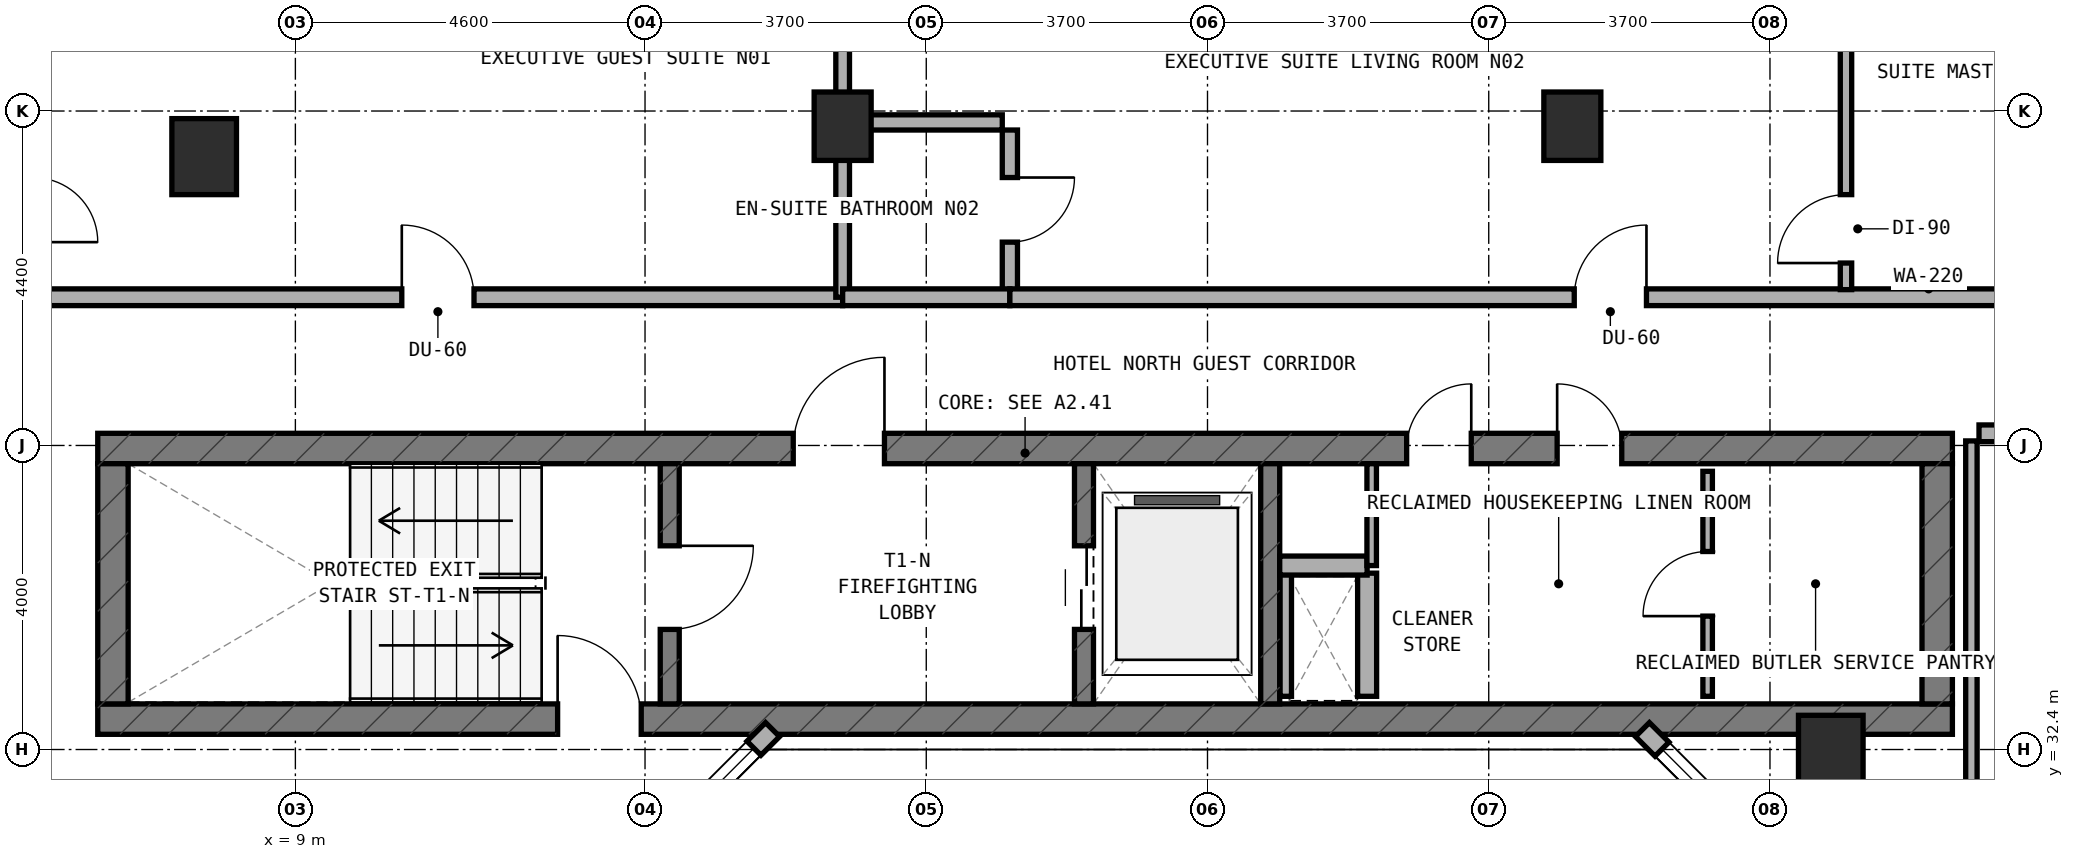
"""IFC4 building model, lengths in metres.
Left out: names, types, materials, properties, quantities, classifications, styles, units other than length and angle.
Written with IfcOpenShell. Run it as: python <this file> out.ifc"""

import sys

from ifc_helpers import new_model, si_unit, direction, frame, frame_2d, origin, origin_2d, place, context, subcontext, project, spatial, rectangle, extrude, element, fill, save


model = new_model("IFC4")
c1 = context("Model", 3, precision=1e-05, world=origin(), true_north=direction((0.0, 1.0)))
c2 = subcontext(c1, "Body", "Model", "MODEL_VIEW")
j1 = project(units=[si_unit("LENGTHUNIT", "METRE"), si_unit("PLANEANGLEUNIT", "RADIAN")], contexts=[c1])
p1 = place(None, origin())
s1 = spatial("IfcSite", under=j1, at=p1, CompositionType="ELEMENT")
p2 = place(p1, origin())
s2 = spatial("IfcBuilding", under=s1, at=p2, CompositionType="ELEMENT")
p3 = place(p2, frame((0.0, 0.0, 181.1)))
s3 = spatial("IfcBuildingStorey", under=s2, at=p3, CompositionType="ELEMENT", Elevation=181.1)
p4 = place(p3, frame((6.4, 32.8, 0.0), z_axis=(0.0, 0.0, 1.0), x_axis=(1.0, 0.0, 0.0)))
e1 = element("IfcWall", 1, at=p4, inside=s3, PredefinedType="SHEAR", context=c2, shape_type="SweptSolid", body=[
    extrude(rectangle(XDim=24.4, YDim=0.4, at=frame_2d((12.2, 0.0))), origin(), (0.0, 0.0, 1.0), 3.6),
])
p5 = place(p4, frame((6.05, 0.0, 0.0)))
e2 = element("IfcOpeningElement", 2, at=p5, cuts=e1, PredefinedType="OPENING", context=c2, shape_type="SweptSolid", body=[
    extrude(rectangle(XDim=1.1, YDim=2.15, at=frame_2d((0.55, 1.075))), frame((0.0, 0.21, 0.0), z_axis=(0.0, -1.0, 0.0), x_axis=(1.0, 0.0, 0.0)), (0.0, 0.0, 1.0), 0.42),
])
p6 = place(p3, frame((6.4, 36.36, 0.0), z_axis=(0.0, 0.0, 1.0), x_axis=(1.0, 0.0, 0.0)))
e3 = element("IfcWall", 3, at=p6, inside=s3, PredefinedType="SHEAR", context=c2, shape_type="SweptSolid", body=[
    extrude(rectangle(XDim=24.4, YDim=0.4, at=frame_2d((12.2, 0.0))), origin(), (0.0, 0.0, 1.0), 3.6),
])
p7 = place(p6, frame((9.15, 0.0, 0.0)))
e4 = element("IfcOpeningElement", 4, at=p7, cuts=e3, PredefinedType="OPENING", context=c2, shape_type="SweptSolid", body=[
    extrude(rectangle(XDim=1.2, YDim=2.15, at=frame_2d((0.6, 1.075))), frame((0.0, 0.21, 0.0), z_axis=(0.0, -1.0, 0.0), x_axis=(1.0, 0.0, 0.0)), (0.0, 0.0, 1.0), 0.42),
])
p8 = place(p6, frame((19.2, 0.0, 0.0)))
e5 = element("IfcOpeningElement", 5, at=p8, cuts=e3, PredefinedType="OPENING", context=c2, shape_type="SweptSolid", body=[
    extrude(rectangle(XDim=0.85, YDim=2.1, at=frame_2d((0.425, 1.05))), frame((0.0, 0.21, 0.0), z_axis=(0.0, -1.0, 0.0), x_axis=(1.0, 0.0, 0.0)), (0.0, 0.0, 1.0), 0.42),
])
p9 = place(p6, frame((17.22, 0.0, 0.0)))
e6 = element("IfcOpeningElement", 6, at=p9, cuts=e3, PredefinedType="OPENING", context=c2, shape_type="SweptSolid", body=[
    extrude(rectangle(XDim=0.85, YDim=2.1, at=frame_2d((0.425, 1.05))), frame((0.0, 0.21, 0.0), z_axis=(0.0, -1.0, 0.0), x_axis=(1.0, 0.0, 0.0)), (0.0, 0.0, 1.0), 0.42),
])
for number, where, z_axis, x_axis in (
    (7, (6.6, 33.0, 0.0), (0.0, 0.0, 1.0), (0.0, 1.0, 0.0)),
    (8, (30.6, 33.0, 0.0), (0.0, 0.0, 1.0), (0.0, 1.0, 0.0)),
):
    element("IfcWall", number, at=place(p3, frame(where, z_axis=z_axis, x_axis=x_axis)), inside=s3, PredefinedType="SHEAR", context=c2, shape_type="SweptSolid", body=[
        extrude(rectangle(XDim=3.16, YDim=0.4, at=frame_2d((1.58, 0.0))), origin(), (0.0, 0.0, 1.0), 3.6),
    ])
p10 = place(p3, frame((13.925, 33.0, 0.0), z_axis=(0.0, 0.0, 1.0), x_axis=(0.0, 1.0, 0.0)))
e9 = element("IfcWall", 9, at=p10, inside=s3, PredefinedType="STANDARD", context=c2, shape_type="SweptSolid", body=[
    extrude(rectangle(XDim=3.16, YDim=0.25, at=frame_2d((1.58, 0.0))), origin(), (0.0, 0.0, 1.0), 3.32),
])
p11 = place(p10, frame((0.98, 0.0, 0.0)))
e10 = element("IfcOpeningElement", 10, at=p11, cuts=e9, PredefinedType="OPENING", context=c2, shape_type="SweptSolid", body=[
    extrude(rectangle(XDim=1.1, YDim=2.15, at=frame_2d((0.55, 1.075))), frame((0.0, 0.135, 0.0), z_axis=(0.0, -1.0, 0.0), x_axis=(1.0, 0.0, 0.0)), (0.0, 0.0, 1.0), 0.27),
])
p12 = place(p3, frame((19.375, 33.0, 0.0), z_axis=(0.0, 0.0, 1.0), x_axis=(0.0, 1.0, 0.0)))
e11 = element("IfcWall", 11, at=p12, inside=s3, PredefinedType="STANDARD", context=c2, shape_type="SweptSolid", body=[
    extrude(rectangle(XDim=3.16, YDim=0.25, at=frame_2d((1.58, 0.0))), origin(), (0.0, 0.0, 1.0), 3.32),
])
p13 = place(p12, frame((0.98, 0.0, 0.0)))
e12 = element("IfcOpeningElement", 12, at=p13, cuts=e11, PredefinedType="OPENING", context=c2, shape_type="SweptSolid", body=[
    extrude(rectangle(XDim=1.1, YDim=2.15, at=frame_2d((0.55, 1.075))), frame((0.0, 0.135, 0.0), z_axis=(0.0, -1.0, 0.0), x_axis=(1.0, 0.0, 0.0)), (0.0, 0.0, 1.0), 0.27),
])
p14 = place(p3, frame((21.825, 33.0, 0.0), z_axis=(0.0, 0.0, 1.0), x_axis=(0.0, 1.0, 0.0)))
e13 = element("IfcWall", 13, at=p14, inside=s3, PredefinedType="STANDARD", context=c2, shape_type="SweptSolid", body=[
    extrude(rectangle(XDim=3.16, YDim=0.25, at=frame_2d((1.58, 0.0))), origin(), (0.0, 0.0, 1.0), 3.32),
])
for number, where, z_axis, x_axis in (
    (14, (16.2, 40.6, 0.0), (0.0, 0.0, 1.0), (1.0, 0.0, 0.0)),
    (15, (25.8, 40.6, 0.0), (0.0, 0.0, 1.0), (1.0, 0.0, 0.0)),
):
    element("IfcColumn", number, at=place(p3, frame(where, z_axis=z_axis, x_axis=x_axis)), inside=s3, PredefinedType="COLUMN", context=c2, shape_type="SweptSolid", body=[
        extrude(rectangle(XDim=0.75, YDim=0.9, at=origin_2d()), origin(), (0.0, 0.0, 1.0), 3.6),
    ])
for number, where, z_axis, x_axis in (
    (16, (7.8, 40.2, 0.0), (0.0, 0.0, 1.0), (1.0, 0.0, 0.0)),
    (17, (29.2, 32.35, 0.0), (0.0, 0.0, 1.0), (1.0, 0.0, 0.0)),
):
    element("IfcColumn", number, at=place(p3, frame(where, z_axis=z_axis, x_axis=x_axis)), inside=s3, PredefinedType="COLUMN", context=c2, shape_type="SweptSolid", body=[
        extrude(rectangle(XDim=0.85, YDim=1.0, at=origin_2d()), origin(), (0.0, 0.0, 1.0), 3.6),
    ])
p15 = place(p3, frame((13.515, 30.899, 0.0), z_axis=(0.0, 0.0, 1.0), x_axis=(0.707106781187, 0.707106781187, 0.0)))
e18 = element("IfcWall", 18, at=p15, inside=s3, PredefinedType="STANDARD", context=c2, shape_type="SweptSolid", body=[
    extrude(rectangle(XDim=2.493, YDim=0.26, at=frame_2d((1.247, 0.0))), origin(), (0.0, 0.0, 1.0), 3.32),
])
p16 = place(p15, frame((0.347, 0.0, 0.85)))
e19 = element("IfcOpeningElement", 19, at=p16, cuts=e18, PredefinedType="OPENING", context=c2, shape_type="SweptSolid", body=[
    extrude(rectangle(XDim=1.8, YDim=1.5, at=frame_2d((0.9, 0.75))), frame((0.0, 0.14, 0.0), z_axis=(0.0, -1.0, 0.0), x_axis=(1.0, 0.0, 0.0)), (0.0, 0.0, 1.0), 0.28),
])
p17 = place(p3, frame((26.722, 32.662, 0.0), z_axis=(0.0, 0.0, 1.0), x_axis=(0.707106781187, -0.707106781187, 0.0)))
e20 = element("IfcWall", 20, at=p17, inside=s3, PredefinedType="STANDARD", context=c2, shape_type="SweptSolid", body=[
    extrude(rectangle(XDim=2.529, YDim=0.26, at=frame_2d((1.264, 0.0))), origin(), (0.0, 0.0, 1.0), 3.32),
])
p18 = place(p17, frame((0.364, 0.0, 0.85)))
e21 = element("IfcOpeningElement", 21, at=p18, cuts=e20, PredefinedType="OPENING", context=c2, shape_type="SweptSolid", body=[
    extrude(rectangle(XDim=1.8, YDim=1.5, at=frame_2d((0.9, 0.75))), frame((0.0, 0.14, 0.0), z_axis=(0.0, -1.0, 0.0), x_axis=(1.0, 0.0, 0.0)), (0.0, 0.0, 1.0), 0.28),
])
p19 = place(p3, frame((27.58, 33.1, 0.0), z_axis=(0.0, 0.0, 1.0), x_axis=(0.0, 1.0, 0.0)))
e22 = element("IfcWall", 22, at=p19, inside=s3, PredefinedType="PARTITIONING", context=c2, shape_type="SweptSolid", body=[
    extrude(rectangle(XDim=2.96, YDim=0.125, at=frame_2d((1.48, 0.0))), origin(), (0.0, 0.0, 1.0), 2.995),
])
p20 = place(p19, frame((1.055, 0.0, 0.0)))
e23 = element("IfcOpeningElement", 23, at=p20, cuts=e22, PredefinedType="OPENING", context=c2, shape_type="SweptSolid", body=[
    extrude(rectangle(XDim=0.85, YDim=2.1, at=frame_2d((0.425, 1.05))), frame((0.0, 0.073, 0.0), z_axis=(0.0, -1.0, 0.0), x_axis=(1.0, 0.0, 0.0)), (0.0, 0.0, 1.0), 0.145),
])
p21 = place(p3, frame((22.03, 33.1, 0.0), z_axis=(0.0, 0.0, 1.0), x_axis=(0.0, 1.0, 0.0)))
e24 = element("IfcWall", 24, at=p21, inside=s3, PredefinedType="PARTITIONING", context=c2, shape_type="SweptSolid", body=[
    extrude(rectangle(XDim=1.62, YDim=0.15, at=frame_2d((0.81, 0.0))), origin(), (0.0, 0.0, 1.0), 3.32),
])
p22 = place(p3, frame((23.1, 33.1, 0.0), z_axis=(0.0, 0.0, 1.0), x_axis=(0.0, 1.0, 0.0)))
e25 = element("IfcWall", 25, at=p22, inside=s3, PredefinedType="SOLIDWALL", context=c2, shape_type="SweptSolid", body=[
    extrude(rectangle(XDim=1.62, YDim=0.25, at=frame_2d((0.81, 0.0))), origin(), (0.0, 0.0, 1.0), 3.32),
])
p23 = place(p3, frame((21.95, 34.82, 0.0), z_axis=(0.0, 0.0, 1.0), x_axis=(1.0, 0.0, 0.0)))
e26 = element("IfcWall", 26, at=p23, inside=s3, PredefinedType="SOLIDWALL", context=c2, shape_type="SweptSolid", body=[
    extrude(rectangle(XDim=1.15, YDim=0.25, at=frame_2d((0.575, 0.0))), origin(), (0.0, 0.0, 1.0), 3.32),
])
p24 = place(p3, frame((23.16, 34.82, 0.0), z_axis=(0.0, 0.0, 1.0), x_axis=(0.0, 1.0, 0.0)))
e27 = element("IfcWall", 27, at=p24, inside=s3, PredefinedType="PARTITIONING", context=c2, shape_type="SweptSolid", body=[
    extrude(rectangle(XDim=1.34, YDim=0.125, at=frame_2d((0.67, 0.0))), origin(), (0.0, 0.0, 1.0), 3.32),
])
p25 = place(p3, frame((5.55, 38.35, 0.0), z_axis=(0.0, 0.0, 1.0), x_axis=(1.0, 0.0, 0.0)))
e28 = element("IfcWall", 28, at=p25, inside=s3, PredefinedType="SOLIDWALL", context=c2, shape_type="SweptSolid", body=[
    extrude(rectangle(XDim=10.65, YDim=0.22, at=frame_2d((5.325, 0.0))), origin(), (0.0, 0.0, 1.0), 2.995),
])
p26 = place(p25, frame((4.85, 0.0, 0.0)))
e29 = element("IfcOpeningElement", 29, at=p26, cuts=e28, PredefinedType="OPENING", context=c2, shape_type="SweptSolid", body=[
    extrude(rectangle(XDim=0.95, YDim=2.1, at=frame_2d((0.475, 1.05))), frame((0.0, 0.12, 0.0), z_axis=(0.0, -1.0, 0.0), x_axis=(1.0, 0.0, 0.0)), (0.0, 0.0, 1.0), 0.24),
])
p27 = place(p3, frame((16.2, 38.35, 0.0), z_axis=(0.0, 0.0, 1.0), x_axis=(0.0, 1.0, 0.0)))
e30 = element("IfcWall", 30, at=p27, inside=s3, PredefinedType="SOLIDWALL", context=c2, shape_type="SweptSolid", body=[
    extrude(rectangle(XDim=6.19, YDim=0.18, at=frame_2d((3.095, 0.0))), origin(), (0.0, 0.0, 1.0), 2.935),
])
p28 = place(p3, frame((18.4, 38.45, 0.0), z_axis=(0.0, 0.0, 1.0), x_axis=(0.0, 1.0, 0.0)))
e31 = element("IfcWall", 31, at=p28, inside=s3, PredefinedType="PLUMBINGWALL", context=c2, shape_type="SweptSolid", body=[
    extrude(rectangle(XDim=2.1, YDim=0.2, at=frame_2d((1.05, 0.0))), origin(), (0.0, 0.0, 1.0), 2.895),
])
p29 = place(p28, frame((0.625, 0.0, 0.0)))
e32 = element("IfcOpeningElement", 32, at=p29, cuts=e31, PredefinedType="OPENING", context=c2, shape_type="SweptSolid", body=[
    extrude(rectangle(XDim=0.85, YDim=2.1, at=frame_2d((0.425, 1.05))), frame((0.0, 0.11, 0.0), z_axis=(0.0, -1.0, 0.0), x_axis=(1.0, 0.0, 0.0)), (0.0, 0.0, 1.0), 0.22),
])
p30 = place(p3, frame((16.3, 40.65, 0.0), z_axis=(0.0, 0.0, 1.0), x_axis=(1.0, 0.0, 0.0)))
e33 = element("IfcWall", 33, at=p30, inside=s3, PredefinedType="PLUMBINGWALL", context=c2, shape_type="SweptSolid", body=[
    extrude(rectangle(XDim=2.0, YDim=0.2, at=frame_2d((1.0, 0.0))), origin(), (0.0, 0.0, 1.0), 2.935),
])
p31 = place(p3, frame((16.2, 38.35, 0.0), z_axis=(0.0, 0.0, 1.0), x_axis=(1.0, 0.0, 0.0)))
e34 = element("IfcWall", 34, at=p31, inside=s3, PredefinedType="SOLIDWALL", context=c2, shape_type="SweptSolid", body=[
    extrude(rectangle(XDim=2.2, YDim=0.22, at=frame_2d((1.1, 0.0))), origin(), (0.0, 0.0, 1.0), 2.995),
])
p32 = place(p3, frame((18.4, 38.35, 0.0), z_axis=(0.0, 0.0, 1.0), x_axis=(1.0, 0.0, 0.0)))
e35 = element("IfcWall", 35, at=p32, inside=s3, PredefinedType="SOLIDWALL", context=c2, shape_type="SweptSolid", body=[
    extrude(rectangle(XDim=15.8, YDim=0.22, at=frame_2d((7.9, 0.0))), origin(), (0.0, 0.0, 1.0), 2.995),
])
p33 = place(p32, frame((7.425, 0.0, 0.0)))
e36 = element("IfcOpeningElement", 36, at=p33, cuts=e35, PredefinedType="OPENING", context=c2, shape_type="SweptSolid", body=[
    extrude(rectangle(XDim=0.95, YDim=2.1, at=frame_2d((0.475, 1.05))), frame((0.0, 0.12, 0.0), z_axis=(0.0, -1.0, 0.0), x_axis=(1.0, 0.0, 0.0)), (0.0, 0.0, 1.0), 0.24),
])
p34 = place(p3, frame((29.4, 38.45, 0.0), z_axis=(0.0, 0.0, 1.0), x_axis=(0.0, 1.0, 0.0)))
e37 = element("IfcWall", 37, at=p34, inside=s3, PredefinedType="PARTITIONING", context=c2, shape_type="SweptSolid", body=[
    extrude(rectangle(XDim=5.503, YDim=0.15, at=frame_2d((2.751, 0.0))), origin(), (0.0, 0.0, 1.0), 2.895),
])
p35 = place(p34, frame((0.35, 0.0, 0.0)))
e38 = element("IfcOpeningElement", 38, at=p35, cuts=e37, PredefinedType="OPENING", context=c2, shape_type="SweptSolid", body=[
    extrude(rectangle(XDim=0.9, YDim=2.1, at=frame_2d((0.45, 1.05))), frame((0.0, 0.085, 0.0), z_axis=(0.0, -1.0, 0.0), x_axis=(1.0, 0.0, 0.0)), (0.0, 0.0, 1.0), 0.17),
])
p36 = place(p3, frame((31.05, 29.8, 0.0), z_axis=(0.0, 0.0, 1.0), x_axis=(0.0, 1.0, 0.0)))
e39 = element("IfcWall", 39, at=p36, inside=s3, PredefinedType="PARTITIONING", context=c2, shape_type="SweptSolid", body=[
    extrude(rectangle(XDim=6.66, YDim=0.15, at=frame_2d((3.33, 0.0))), origin(), (0.0, 0.0, 1.0), 2.995),
])
p37 = place(p3, frame((31.15, 36.56, 0.0), z_axis=(0.0, 0.0, 1.0), x_axis=(1.0, 0.0, 0.0)))
e40 = element("IfcWall", 40, at=p37, inside=s3, PredefinedType="SOLIDWALL", context=c2, shape_type="SweptSolid", body=[
    extrude(rectangle(XDim=9.15, YDim=0.22, at=frame_2d((4.575, 0.0))), origin(), (0.0, 0.0, 1.0), 2.935),
])
p38 = place(p37, frame((3.612, 0.0, 0.0)))
e41 = element("IfcOpeningElement", 41, at=p38, cuts=e40, PredefinedType="OPENING", context=c2, shape_type="SweptSolid", body=[
    extrude(rectangle(XDim=1.1, YDim=2.1, at=frame_2d((0.55, 1.05))), frame((0.0, 0.12, 0.0), z_axis=(0.0, -1.0, 0.0), x_axis=(1.0, 0.0, 0.0)), (0.0, 0.0, 1.0), 0.24),
])
p39 = place(p16, origin())
e42 = element("IfcWindow", 42, at=p39, inside=s3, PartitioningType="SINGLE_PANEL", PredefinedType="WINDOW", context=c2, shape_type="SweptSolid", body=[
    extrude(rectangle(XDim=1.8, YDim=1.5, at=frame_2d((0.9, 0.75))), frame((0.0, 0.03, 0.0), z_axis=(0.0, -1.0, 0.0), x_axis=(1.0, 0.0, 0.0)), (0.0, 0.0, 1.0), 0.06),
])
fill(e19, e42)
p40 = place(p18, origin())
e43 = element("IfcWindow", 43, at=p40, inside=s3, PartitioningType="SINGLE_PANEL", PredefinedType="WINDOW", context=c2, shape_type="SweptSolid", body=[
    extrude(rectangle(XDim=1.8, YDim=1.5, at=frame_2d((0.9, 0.75))), frame((0.0, 0.03, 0.0), z_axis=(0.0, -1.0, 0.0), x_axis=(1.0, 0.0, 0.0)), (0.0, 0.0, 1.0), 0.06),
])
fill(e21, e43)
p41 = place(p11, frame((1.1, 0.0, 0.0), z_axis=(0.0, 0.0, 1.0), x_axis=(-1.0, 0.0, 0.0)))
e44 = element("IfcDoor", 44, at=p41, inside=s3, OperationType="SINGLE_SWING_LEFT", PredefinedType="DOOR", context=c2, shape_type="SweptSolid", body=[
    extrude(rectangle(XDim=1.1, YDim=2.15, at=frame_2d((0.55, 1.075))), frame((0.0, 0.025, 0.0), z_axis=(0.0, -1.0, 0.0), x_axis=(1.0, 0.0, 0.0)), (0.0, 0.0, 1.0), 0.05),
])
fill(e10, e44)
p42 = place(p7, origin())
e45 = element("IfcDoor", 45, at=p42, inside=s3, OperationType="SINGLE_SWING_RIGHT", PredefinedType="DOOR", context=c2, shape_type="SweptSolid", body=[
    extrude(rectangle(XDim=1.2, YDim=2.15, at=frame_2d((0.6, 1.075))), frame((0.0, 0.025, 0.0), z_axis=(0.0, -1.0, 0.0), x_axis=(1.0, 0.0, 0.0)), (0.0, 0.0, 1.0), 0.05),
])
fill(e4, e45)
p43 = place(p13, origin())
e46 = element("IfcDoor", 46, at=p43, inside=s3, OperationType="DOUBLE_DOOR_SLIDING", PredefinedType="DOOR", context=c2, shape_type="SweptSolid", body=[
    extrude(rectangle(XDim=1.1, YDim=2.15, at=frame_2d((0.55, 1.075))), frame((0.0, 0.025, 0.0), z_axis=(0.0, -1.0, 0.0), x_axis=(1.0, 0.0, 0.0)), (0.0, 0.0, 1.0), 0.05),
])
fill(e12, e46)
p44 = place(p8, origin())
e47 = element("IfcDoor", 47, at=p44, inside=s3, OperationType="SINGLE_SWING_LEFT", PredefinedType="DOOR", context=c2, shape_type="SweptSolid", body=[
    extrude(rectangle(XDim=0.85, YDim=2.1, at=frame_2d((0.425, 1.05))), frame((0.0, 0.025, 0.0), z_axis=(0.0, -1.0, 0.0), x_axis=(1.0, 0.0, 0.0)), (0.0, 0.0, 1.0), 0.05),
])
fill(e5, e47)
p45 = place(p9, origin())
e48 = element("IfcDoor", 48, at=p45, inside=s3, OperationType="SINGLE_SWING_RIGHT", PredefinedType="DOOR", context=c2, shape_type="SweptSolid", body=[
    extrude(rectangle(XDim=0.85, YDim=2.1, at=frame_2d((0.425, 1.05))), frame((0.0, 0.025, 0.0), z_axis=(0.0, -1.0, 0.0), x_axis=(1.0, 0.0, 0.0)), (0.0, 0.0, 1.0), 0.05),
])
fill(e6, e48)
p46 = place(p5, origin())
e49 = element("IfcDoor", 49, at=p46, inside=s3, OperationType="SINGLE_SWING_LEFT", PredefinedType="DOOR", context=c2, shape_type="SweptSolid", body=[
    extrude(rectangle(XDim=1.1, YDim=2.15, at=frame_2d((0.55, 1.075))), frame((0.0, 0.025, 0.0), z_axis=(0.0, -1.0, 0.0), x_axis=(1.0, 0.0, 0.0)), (0.0, 0.0, 1.0), 0.05),
])
fill(e2, e49)
p47 = place(p20, origin())
e50 = element("IfcDoor", 50, at=p47, inside=s3, OperationType="SINGLE_SWING_LEFT", PredefinedType="DOOR", context=c2, shape_type="SweptSolid", body=[
    extrude(rectangle(XDim=0.85, YDim=2.1, at=frame_2d((0.425, 1.05))), frame((0.0, 0.025, 0.0), z_axis=(0.0, -1.0, 0.0), x_axis=(1.0, 0.0, 0.0)), (0.0, 0.0, 1.0), 0.05),
])
fill(e23, e50)
p48 = place(p26, origin())
e51 = element("IfcDoor", 51, at=p48, inside=s3, OperationType="SINGLE_SWING_LEFT", PredefinedType="DOOR", context=c2, shape_type="SweptSolid", body=[
    extrude(rectangle(XDim=0.95, YDim=2.1, at=frame_2d((0.475, 1.05))), frame((0.0, 0.025, 0.0), z_axis=(0.0, -1.0, 0.0), x_axis=(1.0, 0.0, 0.0)), (0.0, 0.0, 1.0), 0.05),
])
fill(e29, e51)
p49 = place(p29, frame((0.85, 0.0, 0.0), z_axis=(0.0, 0.0, 1.0), x_axis=(-1.0, 0.0, 0.0)))
e52 = element("IfcDoor", 52, at=p49, inside=s3, OperationType="SINGLE_SWING_LEFT", PredefinedType="DOOR", context=c2, shape_type="SweptSolid", body=[
    extrude(rectangle(XDim=0.85, YDim=2.1, at=frame_2d((0.425, 1.05))), frame((0.0, 0.025, 0.0), z_axis=(0.0, -1.0, 0.0), x_axis=(1.0, 0.0, 0.0)), (0.0, 0.0, 1.0), 0.05),
])
fill(e32, e52)
p50 = place(p33, origin())
e53 = element("IfcDoor", 53, at=p50, inside=s3, OperationType="SINGLE_SWING_RIGHT", PredefinedType="DOOR", context=c2, shape_type="SweptSolid", body=[
    extrude(rectangle(XDim=0.95, YDim=2.1, at=frame_2d((0.475, 1.05))), frame((0.0, 0.025, 0.0), z_axis=(0.0, -1.0, 0.0), x_axis=(1.0, 0.0, 0.0)), (0.0, 0.0, 1.0), 0.05),
])
fill(e36, e53)
p51 = place(p35, origin())
e54 = element("IfcDoor", 54, at=p51, inside=s3, OperationType="SINGLE_SWING_LEFT", PredefinedType="DOOR", context=c2, shape_type="SweptSolid", body=[
    extrude(rectangle(XDim=0.9, YDim=2.1, at=frame_2d((0.45, 1.05))), frame((0.0, 0.025, 0.0), z_axis=(0.0, -1.0, 0.0), x_axis=(1.0, 0.0, 0.0)), (0.0, 0.0, 1.0), 0.05),
])
fill(e38, e54)
save(model, sys.argv[1])
